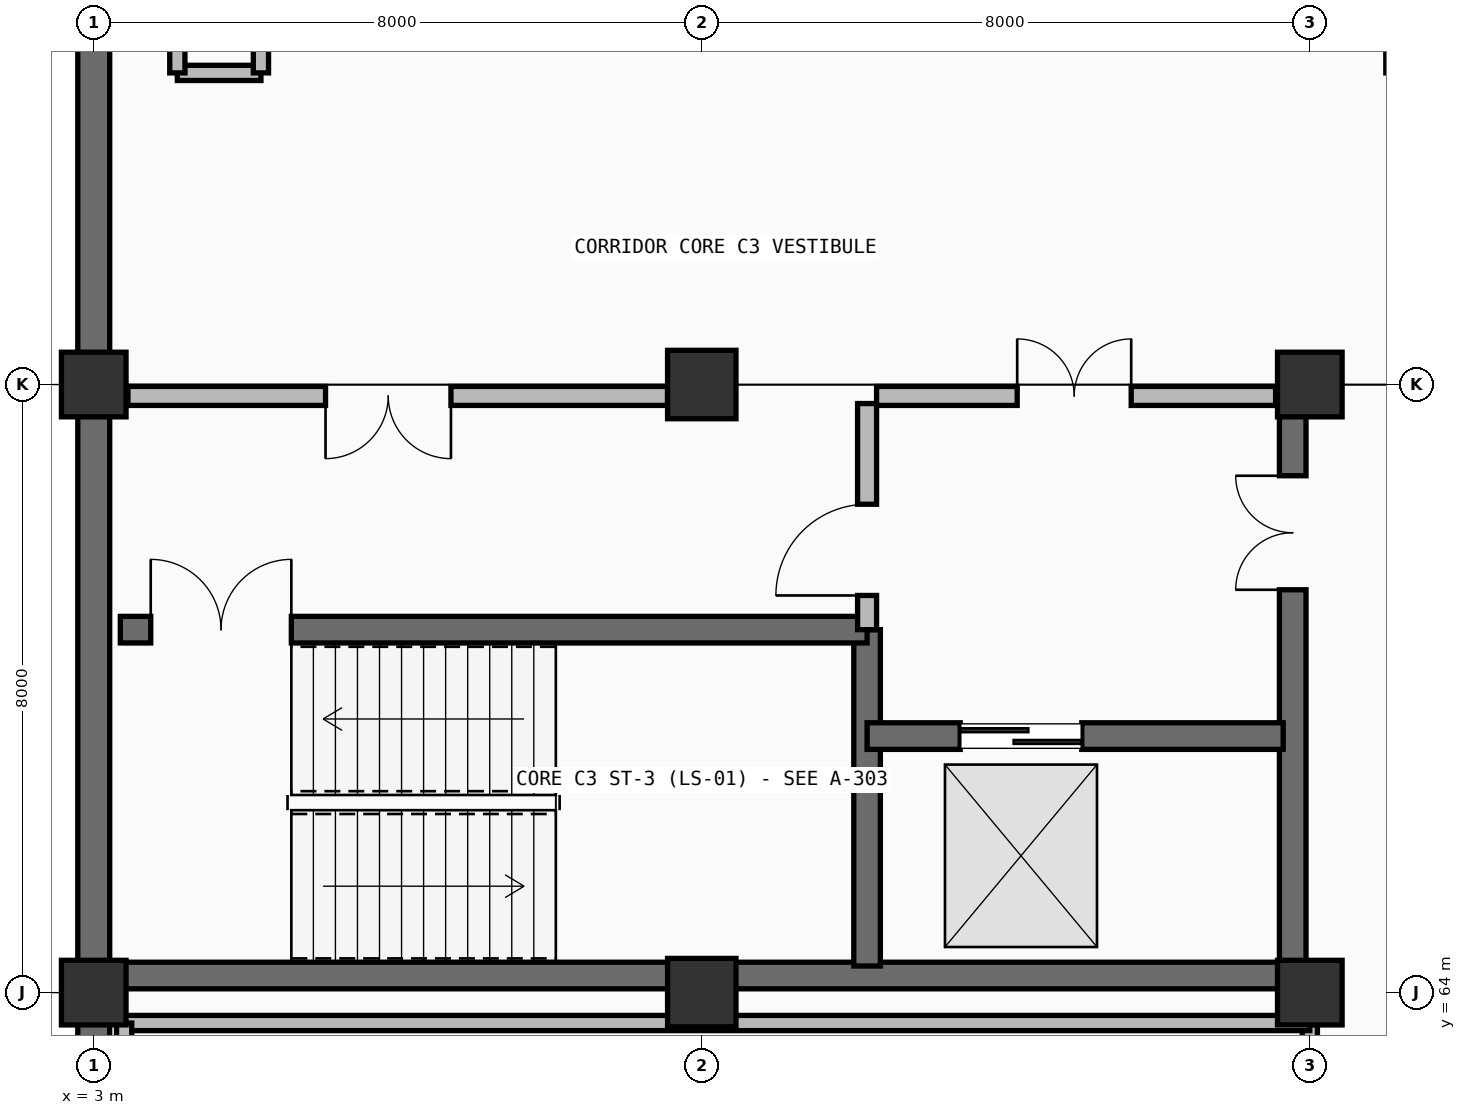
"""IFC4 building model, lengths in metres.
Left out: names, types, materials, properties, quantities, classifications, styles, units other than length and angle.
Written with IfcOpenShell. Run it as: python <this file> out.ifc"""

import sys

from ifc_helpers import new_model, si_unit, direction, frame, frame_2d, origin, origin_2d, place, context, subcontext, project, spatial, rectangle, extrude, element, fill, save


model = new_model("IFC4")
c1 = context("Model", 3, precision=1e-05, world=origin(), true_north=direction((0.0, 1.0)))
c2 = subcontext(c1, "Body", "Model", "MODEL_VIEW")
j1 = project(units=[si_unit("LENGTHUNIT", "METRE"), si_unit("PLANEANGLEUNIT", "RADIAN")], contexts=[c1])
p1 = place(None, origin())
s1 = spatial("IfcSite", under=j1, at=p1, CompositionType="ELEMENT")
p2 = place(p1, origin())
s2 = spatial("IfcBuilding", under=s1, at=p2, CompositionType="ELEMENT")
p3 = place(p2, frame((0.0, 0.0, -4.5)))
s3 = spatial("IfcBuildingStorey", under=s2, at=p3, CompositionType="ELEMENT", Elevation=-4.5)
for number, where, z_axis, x_axis in (
    (1, (3.0, 64.0, -0.6), (0.0, 0.0, 1.0), (1.0, 0.0, 0.0)),
    (2, (3.0, 72.0, -0.6), (0.0, 0.0, 1.0), (1.0, 0.0, 0.0)),
):
    element("IfcColumn", number, at=place(p3, frame(where, z_axis=z_axis, x_axis=x_axis)), inside=s3, PredefinedType="COLUMN", context=c2, shape_type="SweptSolid", body=[
        extrude(rectangle(XDim=0.85, YDim=0.85, at=origin_2d()), origin(), (0.0, 0.0, 1.0), 5.1),
    ])
for number, where, z_axis, x_axis in (
    (3, (11.0, 64.0, -0.6), (0.0, 0.0, 1.0), (1.0, 0.0, 0.0)),
    (4, (11.0, 72.0, -0.6), (0.0, 0.0, 1.0), (1.0, 0.0, 0.0)),
):
    element("IfcColumn", number, at=place(p3, frame(where, z_axis=z_axis, x_axis=x_axis)), inside=s3, PredefinedType="COLUMN", context=c2, shape_type="SweptSolid", body=[
        extrude(rectangle(XDim=0.9, YDim=0.9, at=origin_2d()), origin(), (0.0, 0.0, 1.0), 5.1),
    ])
for number, where, z_axis, x_axis in (
    (5, (19.0, 64.0, -0.6), (0.0, 0.0, 1.0), (1.0, 0.0, 0.0)),
    (6, (19.0, 72.0, -0.6), (0.0, 0.0, 1.0), (1.0, 0.0, 0.0)),
):
    element("IfcColumn", number, at=place(p3, frame(where, z_axis=z_axis, x_axis=x_axis)), inside=s3, PredefinedType="COLUMN", context=c2, shape_type="SweptSolid", body=[
        extrude(rectangle(XDim=0.85, YDim=0.85, at=origin_2d()), origin(), (0.0, 0.0, 1.0), 5.1),
    ])
p4 = place(p3, frame((3.0, 59.0, 0.0), z_axis=(0.0, 0.0, 1.0), x_axis=(0.0, 1.0, 0.0)))
e7 = element("IfcWall", 7, at=p4, inside=s3, PredefinedType="USERDEFINED", context=c2, shape_type="SweptSolid", body=[
    extrude(rectangle(XDim=5.0, YDim=0.42, at=frame_2d((2.5, 0.0))), origin(), (0.0, 0.0, 1.0), 4.5),
])
for number, where, z_axis, x_axis in (
    (8, (3.0, 64.0, 0.0), (0.0, 0.0, 1.0), (0.0, 1.0, 0.0)),
    (9, (3.0, 72.0, 0.0), (0.0, 0.0, 1.0), (0.0, 1.0, 0.0)),
):
    element("IfcWall", number, at=place(p3, frame(where, z_axis=z_axis, x_axis=x_axis)), inside=s3, PredefinedType="USERDEFINED", context=c2, shape_type="SweptSolid", body=[
        extrude(rectangle(XDim=8.0, YDim=0.42, at=frame_2d((4.0, 0.0))), origin(), (0.0, 0.0, 1.0), 4.5),
    ])
p5 = place(p3, frame((3.2, 64.225, 0.0), z_axis=(0.0, 0.0, 1.0), x_axis=(1.0, 0.0, 0.0)))
e10 = element("IfcWall", 10, at=p5, inside=s3, PredefinedType="SHEAR", context=c2, shape_type="SweptSolid", body=[
    extrude(rectangle(XDim=15.6, YDim=0.35, at=frame_2d((7.8, 0.0))), origin(), (0.0, 0.0, 1.0), 4.2),
])
p6 = place(p3, frame((13.175, 64.35, 0.0), z_axis=(0.0, 0.0, 1.0), x_axis=(0.0, 1.0, 0.0)))
e11 = element("IfcWall", 11, at=p6, inside=s3, PredefinedType="SHEAR", context=c2, shape_type="SweptSolid", body=[
    extrude(rectangle(XDim=4.425, YDim=0.35, at=frame_2d((2.212, 0.0))), origin(), (0.0, 0.0, 1.0), 4.2),
])
p7 = place(p3, frame((18.775, 64.2, 0.0), z_axis=(0.0, 0.0, 1.0), x_axis=(0.0, 1.0, 0.0)))
e12 = element("IfcWall", 12, at=p7, inside=s3, PredefinedType="SHEAR", context=c2, shape_type="SweptSolid", body=[
    extrude(rectangle(XDim=7.6, YDim=0.35, at=frame_2d((3.8, 0.0))), origin(), (0.0, 0.0, 1.0), 4.2),
])
p8 = place(p7, frame((5.1, 0.0, 0.0)))
e13 = element("IfcOpeningElement", 13, at=p8, cuts=e12, PredefinedType="OPENING", context=c2, shape_type="SweptSolid", body=[
    extrude(rectangle(XDim=1.5, YDim=2.2, at=frame_2d((0.75, 1.1))), frame((0.0, 0.185, 0.0), z_axis=(0.0, -1.0, 0.0), x_axis=(1.0, 0.0, 0.0)), (0.0, 0.0, 1.0), 0.37),
])
p9 = place(p3, frame((3.35, 68.775, 0.0), z_axis=(0.0, 0.0, 1.0), x_axis=(1.0, 0.0, 0.0)))
e14 = element("IfcWall", 14, at=p9, inside=s3, PredefinedType="SHEAR", context=c2, shape_type="SweptSolid", body=[
    extrude(rectangle(XDim=9.825, YDim=0.35, at=frame_2d((4.913, 0.0))), origin(), (0.0, 0.0, 1.0), 4.2),
])
p10 = place(p9, frame((0.4, 0.0, 0.0)))
e15 = element("IfcOpeningElement", 15, at=p10, cuts=e14, PredefinedType="OPENING", context=c2, shape_type="SweptSolid", body=[
    extrude(rectangle(XDim=1.85, YDim=2.25, at=frame_2d((0.925, 1.125))), frame((0.0, 0.185, 0.0), z_axis=(0.0, -1.0, 0.0), x_axis=(1.0, 0.0, 0.0)), (0.0, 0.0, 1.0), 0.37),
])
p11 = place(p3, frame((13.175, 67.375, 0.0), z_axis=(0.0, 0.0, 1.0), x_axis=(1.0, 0.0, 0.0)))
e16 = element("IfcWall", 16, at=p11, inside=s3, PredefinedType="SHEAR", context=c2, shape_type="SweptSolid", body=[
    extrude(rectangle(XDim=5.475, YDim=0.35, at=frame_2d((2.737, 0.0))), origin(), (0.0, 0.0, 1.0), 4.2),
])
p12 = place(p11, frame((1.225, 0.0, 0.0)))
e17 = element("IfcOpeningElement", 17, at=p12, cuts=e16, PredefinedType="OPENING", context=c2, shape_type="SweptSolid", body=[
    extrude(rectangle(XDim=1.6, YDim=2.4, at=frame_2d((0.8, 1.2))), frame((0.0, 0.185, 0.0), z_axis=(0.0, -1.0, 0.0), x_axis=(1.0, 0.0, 0.0)), (0.0, 0.0, 1.0), 0.37),
])
p13 = place(p3, frame((13.175, 68.775, 0.0), z_axis=(0.0, 0.0, 1.0), x_axis=(0.0, 1.0, 0.0)))
e18 = element("IfcWall", 18, at=p13, inside=s3, PredefinedType="PARTITIONING", context=c2, shape_type="SweptSolid", body=[
    extrude(rectangle(XDim=2.975, YDim=0.25, at=frame_2d((1.488, 0.0))), origin(), (0.0, 0.0, 1.0), 4.2),
])
p14 = place(p13, frame((0.45, 0.0, 0.0)))
e19 = element("IfcOpeningElement", 19, at=p14, cuts=e18, PredefinedType="OPENING", context=c2, shape_type="SweptSolid", body=[
    extrude(rectangle(XDim=1.2, YDim=2.2, at=frame_2d((0.6, 1.1))), frame((0.0, 0.135, 0.0), z_axis=(0.0, -1.0, 0.0), x_axis=(1.0, 0.0, 0.0)), (0.0, 0.0, 1.0), 0.27),
])
p15 = place(p3, frame((3.45, 71.85, 0.0), z_axis=(0.0, 0.0, 1.0), x_axis=(1.0, 0.0, 0.0)))
e20 = element("IfcWall", 20, at=p15, inside=s3, PredefinedType="PARTITIONING", context=c2, shape_type="SweptSolid", body=[
    extrude(rectangle(XDim=7.1, YDim=0.25, at=frame_2d((3.55, 0.0))), origin(), (0.0, 0.0, 1.0), 3.435),
])
p16 = place(p15, frame((2.6, 0.0, 0.0)))
e21 = element("IfcOpeningElement", 21, at=p16, cuts=e20, PredefinedType="OPENING", context=c2, shape_type="SweptSolid", body=[
    extrude(rectangle(XDim=1.65, YDim=2.25, at=frame_2d((0.825, 1.125))), frame((0.0, 0.135, 0.0), z_axis=(0.0, -1.0, 0.0), x_axis=(1.0, 0.0, 0.0)), (0.0, 0.0, 1.0), 0.27),
])
p17 = place(p3, frame((13.3, 71.85, 0.0), z_axis=(0.0, 0.0, 1.0), x_axis=(1.0, 0.0, 0.0)))
e22 = element("IfcWall", 22, at=p17, inside=s3, PredefinedType="PARTITIONING", context=c2, shape_type="SweptSolid", body=[
    extrude(rectangle(XDim=5.25, YDim=0.25, at=frame_2d((2.625, 0.0))), origin(), (0.0, 0.0, 1.0), 3.435),
])
p18 = place(p17, frame((1.85, 0.0, 0.0)))
e23 = element("IfcOpeningElement", 23, at=p18, cuts=e22, PredefinedType="OPENING", context=c2, shape_type="SweptSolid", body=[
    extrude(rectangle(XDim=1.5, YDim=2.2, at=frame_2d((0.75, 1.1))), frame((0.0, 0.135, 0.0), z_axis=(0.0, -1.0, 0.0), x_axis=(1.0, 0.0, 0.0)), (0.0, 0.0, 1.0), 0.27),
])
p19 = place(p3, frame((19.0, 38.6, 0.0), z_axis=(0.0, 0.0, 1.0), x_axis=(0.0, 1.0, 0.0)))
e24 = element("IfcWall", 24, at=p19, inside=s3, PredefinedType="PARTITIONING", context=c2, shape_type="SweptSolid", body=[
    extrude(rectangle(XDim=25.0, YDim=0.2, at=frame_2d((12.5, 0.0))), origin(), (0.0, 0.0, 1.0), 3.485),
])
p20 = place(p19, frame((15.601, 0.0, 0.0)))
e25 = element("IfcOpeningElement", 25, at=p20, cuts=e24, PredefinedType="OPENING", context=c2, shape_type="SweptSolid", body=[
    extrude(rectangle(XDim=1.65, YDim=2.25, at=frame_2d((0.825, 1.125))), frame((0.0, 0.11, 0.0), z_axis=(0.0, -1.0, 0.0), x_axis=(1.0, 0.0, 0.0)), (0.0, 0.0, 1.0), 0.22),
])
p21 = place(p3, frame((3.4, 63.6, 0.0), z_axis=(0.0, 0.0, 1.0), x_axis=(1.0, 0.0, 0.0)))
e26 = element("IfcWall", 26, at=p21, inside=s3, PredefinedType="PARTITIONING", context=c2, shape_type="SweptSolid", body=[
    extrude(rectangle(XDim=15.6, YDim=0.2, at=frame_2d((7.8, 0.0))), origin(), (0.0, 0.0, 1.0), 3.435),
])
p22 = place(p3, frame((3.4, 38.6, 0.0), z_axis=(0.0, 0.0, 1.0), x_axis=(0.0, 1.0, 0.0)))
e27 = element("IfcWall", 27, at=p22, inside=s3, PredefinedType="PARTITIONING", context=c2, shape_type="SweptSolid", body=[
    extrude(rectangle(XDim=25.0, YDim=0.2, at=frame_2d((12.5, 0.0))), origin(), (0.0, 0.0, 1.0), 3.505),
])
for number, where, z_axis, x_axis in (
    (28, (4.1, 76.1, 0.0), (0.0, 0.0, 1.0), (1.0, 0.0, 0.0)),
    (29, (4.1, 76.1, 0.0), (0.0, 0.0, 1.0), (0.0, 1.0, 0.0)),
    (30, (5.2, 76.1, 0.0), (0.0, 0.0, 1.0), (0.0, 1.0, 0.0)),
):
    element("IfcWall", number, at=place(p3, frame(where, z_axis=z_axis, x_axis=x_axis)), inside=s3, PredefinedType="PARTITIONING", context=c2, shape_type="SweptSolid", body=[
        extrude(rectangle(XDim=1.1, YDim=0.2, at=frame_2d((0.55, 0.0))), origin(), (0.0, 0.0, 1.0), 4.2),
    ])
p23 = place(p10, origin())
e31 = element("IfcDoor", 31, at=p23, inside=s3, OperationType="DOUBLE_DOOR_SINGLE_SWING", PredefinedType="DOOR", context=c2, shape_type="SweptSolid", body=[
    extrude(rectangle(XDim=1.85, YDim=2.25, at=frame_2d((0.925, 1.125))), frame((0.0, 0.025, 0.0), z_axis=(0.0, -1.0, 0.0), x_axis=(1.0, 0.0, 0.0)), (0.0, 0.0, 1.0), 0.05),
])
fill(e15, e31)
p24 = place(p12, origin())
e32 = element("IfcDoor", 32, at=p24, inside=s3, OperationType="DOUBLE_DOOR_SLIDING", PredefinedType="DOOR", context=c2, shape_type="SweptSolid", body=[
    extrude(rectangle(XDim=1.6, YDim=2.4, at=frame_2d((0.8, 1.2))), frame((0.0, 0.025, 0.0), z_axis=(0.0, -1.0, 0.0), x_axis=(1.0, 0.0, 0.0)), (0.0, 0.0, 1.0), 0.05),
])
fill(e17, e32)
p25 = place(p14, origin())
e33 = element("IfcDoor", 33, at=p25, inside=s3, OperationType="SINGLE_SWING_LEFT", PredefinedType="DOOR", context=c2, shape_type="SweptSolid", body=[
    extrude(rectangle(XDim=1.2, YDim=2.2, at=frame_2d((0.6, 1.1))), frame((0.0, 0.025, 0.0), z_axis=(0.0, -1.0, 0.0), x_axis=(1.0, 0.0, 0.0)), (0.0, 0.0, 1.0), 0.05),
])
fill(e19, e33)
p26 = place(p16, frame((1.65, 0.0, 0.0), z_axis=(0.0, 0.0, 1.0), x_axis=(-1.0, 0.0, 0.0)))
e34 = element("IfcDoor", 34, at=p26, inside=s3, OperationType="DOUBLE_DOOR_SINGLE_SWING", PredefinedType="DOOR", context=c2, shape_type="SweptSolid", body=[
    extrude(rectangle(XDim=1.65, YDim=2.25, at=frame_2d((0.825, 1.125))), frame((0.0, 0.025, 0.0), z_axis=(0.0, -1.0, 0.0), x_axis=(1.0, 0.0, 0.0)), (0.0, 0.0, 1.0), 0.05),
])
fill(e21, e34)
p27 = place(p18, origin())
e35 = element("IfcDoor", 35, at=p27, inside=s3, OperationType="DOUBLE_DOOR_SINGLE_SWING", PredefinedType="DOOR", context=c2, shape_type="SweptSolid", body=[
    extrude(rectangle(XDim=1.5, YDim=2.2, at=frame_2d((0.75, 1.1))), frame((0.0, 0.025, 0.0), z_axis=(0.0, -1.0, 0.0), x_axis=(1.0, 0.0, 0.0)), (0.0, 0.0, 1.0), 0.05),
])
fill(e23, e35)
p28 = place(p8, origin())
e36 = element("IfcDoor", 36, at=p28, inside=s3, OperationType="DOUBLE_DOOR_SINGLE_SWING", PredefinedType="DOOR", context=c2, shape_type="SweptSolid", body=[
    extrude(rectangle(XDim=1.5, YDim=2.2, at=frame_2d((0.75, 1.1))), frame((0.0, 0.025, 0.0), z_axis=(0.0, -1.0, 0.0), x_axis=(1.0, 0.0, 0.0)), (0.0, 0.0, 1.0), 0.05),
])
fill(e13, e36)
save(model, sys.argv[1])
